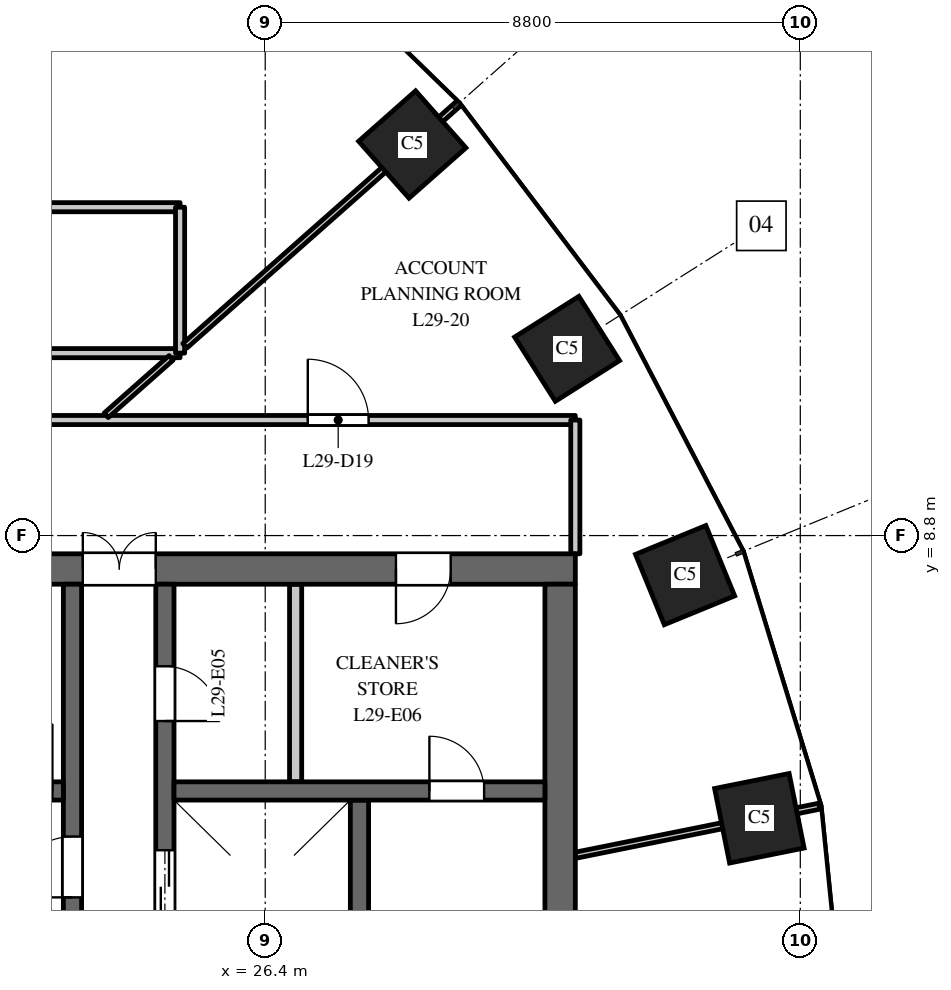
"""IFC4 building model, lengths in metres.
Left out: names, types, materials, properties, quantities, classifications, styles, units other than length and angle.
Written with IfcOpenShell. Run it as: python <this file> out.ifc"""

import sys

from ifc_helpers import new_model, si_unit, direction, frame, frame_2d, origin, origin_2d, place, context, subcontext, project, spatial, rectangle, extrude, element, fill, save


model = new_model("IFC4")
c1 = context("Model", 3, precision=1e-05, world=origin(), true_north=direction((0.0, 1.0)))
c2 = subcontext(c1, "Body", "Model", "MODEL_VIEW")
j1 = project(units=[si_unit("LENGTHUNIT", "METRE"), si_unit("PLANEANGLEUNIT", "RADIAN")], contexts=[c1])
p1 = place(None, origin())
s1 = spatial("IfcSite", under=j1, at=p1, CompositionType="ELEMENT")
p2 = place(p1, origin())
s2 = spatial("IfcBuilding", under=s1, at=p2, CompositionType="ELEMENT")
p3 = place(p2, frame((0.0, 0.0, 128.0)))
s3 = spatial("IfcBuildingStorey", under=s2, at=p3, CompositionType="ELEMENT", Elevation=128.0)
for number, where, z_axis, x_axis in (
    (1, (34.527, 4.151, 0.0), (0.0, 0.0, 1.0), (-0.197, 0.98, 0.0)),
    (2, (33.305, 8.149, 0.0), (0.0, 0.0, 1.0), (-0.379, 0.925, 0.0)),
    (3, (31.365, 11.871, 0.0), (0.0, 0.0, 1.0), (-0.535, 0.845, 0.0)),
    (4, (28.819, 15.23, 0.0), (0.0, 0.0, 1.0), (-0.663, 0.749, 0.0)),
):
    element("IfcColumn", number, at=place(p3, frame(where, z_axis=z_axis, x_axis=x_axis)), inside=s3, PredefinedType="COLUMN", context=c2, shape_type="SweptSolid", body=[
        extrude(rectangle(XDim=1.25, YDim=1.25, at=origin_2d()), origin(), (0.0, 0.0, 1.0), 4.0),
    ])
p4 = place(p3, frame((16.5, 8.25, 0.0), z_axis=(0.0, 0.0, 1.0), x_axis=(1.0, 0.0, 0.0)))
e5 = element("IfcWall", 5, at=p4, inside=s3, PredefinedType="SHEAR", context=c2, shape_type="SweptSolid", body=[
    extrude(rectangle(XDim=15.0, YDim=0.5, at=frame_2d((7.5, 0.0))), origin(), (0.0, 0.0, 1.0), 3.7),
])
p5 = place(p4, frame((6.9, 0.0, 0.0)))
e6 = element("IfcOpeningElement", 6, at=p5, cuts=e5, PredefinedType="OPENING", context=c2, shape_type="SweptSolid", body=[
    extrude(rectangle(XDim=1.2, YDim=2.1, at=frame_2d((0.6, 1.05))), frame((0.0, 0.26, 0.0), z_axis=(0.0, -1.0, 0.0), x_axis=(1.0, 0.0, 0.0)), (0.0, 0.0, 1.0), 0.52),
])
p6 = place(p4, frame((12.05, 0.0, 0.0)))
e7 = element("IfcOpeningElement", 7, at=p6, cuts=e5, PredefinedType="OPENING", context=c2, shape_type="SweptSolid", body=[
    extrude(rectangle(XDim=0.9, YDim=2.1, at=frame_2d((0.45, 1.05))), frame((0.0, 0.26, 0.0), z_axis=(0.0, -1.0, 0.0), x_axis=(1.0, 0.0, 0.0)), (0.0, 0.0, 1.0), 0.52),
])
p7 = place(p3, frame((27.95, -4.45, 0.0), z_axis=(0.0, 0.0, 1.0), x_axis=(0.0, 1.0, 0.0)))
e8 = element("IfcWall", 8, at=p7, inside=s3, PredefinedType="SHEAR", context=c2, shape_type="SweptSolid", body=[
    extrude(rectangle(XDim=8.9, YDim=0.3, at=frame_2d((4.45, 0.0))), origin(), (0.0, 0.0, 1.0), 3.7),
])
p8 = place(p3, frame((24.75, -8.0, 0.0), z_axis=(0.0, 0.0, 1.0), x_axis=(0.0, 1.0, 0.0)))
e9 = element("IfcWall", 9, at=p8, inside=s3, PredefinedType="SHEAR", context=c2, shape_type="SweptSolid", body=[
    extrude(rectangle(XDim=16.0, YDim=0.3, at=frame_2d((8.0, 0.0))), origin(), (0.0, 0.0, 1.0), 3.7),
])
p9 = place(p8, frame((4.425, 0.0, 0.0)))
e10 = element("IfcOpeningElement", 10, at=p9, cuts=e9, PredefinedType="OPENING", context=c2, shape_type="SweptSolid", body=[
    extrude(rectangle(XDim=1.1, YDim=2.1, at=frame_2d((0.55, 1.05))), frame((0.0, 0.16, 0.0), z_axis=(0.0, -1.0, 0.0), x_axis=(1.0, 0.0, 0.0)), (0.0, 0.0, 1.0), 0.32),
])
p10 = place(p8, frame((7.45, 0.0, 0.0)))
e11 = element("IfcOpeningElement", 11, at=p10, cuts=e9, PredefinedType="OPENING", context=c2, shape_type="SweptSolid", body=[
    extrude(rectangle(XDim=1.1, YDim=2.1, at=frame_2d((0.55, 1.05))), frame((0.0, 0.16, 0.0), z_axis=(0.0, -1.0, 0.0), x_axis=(1.0, 0.0, 0.0)), (0.0, 0.0, 1.0), 0.32),
])
p11 = place(p8, frame((10.425, 0.0, 0.0)))
e12 = element("IfcOpeningElement", 12, at=p11, cuts=e9, PredefinedType="OPENING", context=c2, shape_type="SweptSolid", body=[
    extrude(rectangle(XDim=1.2, YDim=2.1, at=frame_2d((0.6, 1.05))), frame((0.0, 0.16, 0.0), z_axis=(0.0, -1.0, 0.0), x_axis=(1.0, 0.0, 0.0)), (0.0, 0.0, 1.0), 0.32),
])
p12 = place(p8, frame((13.75, 0.0, 0.0)))
e13 = element("IfcOpeningElement", 13, at=p12, cuts=e9, PredefinedType="OPENING", context=c2, shape_type="SweptSolid", body=[
    extrude(rectangle(XDim=0.9, YDim=2.1, at=frame_2d((0.45, 1.05))), frame((0.0, 0.16, 0.0), z_axis=(0.0, -1.0, 0.0), x_axis=(1.0, 0.0, 0.0)), (0.0, 0.0, 1.0), 0.32),
])
p13 = place(p8, frame((1.35, 0.0, 0.0)))
e14 = element("IfcOpeningElement", 14, at=p13, cuts=e9, PredefinedType="OPENING", context=c2, shape_type="SweptSolid", body=[
    extrude(rectangle(XDim=0.9, YDim=2.1, at=frame_2d((0.45, 1.05))), frame((0.0, 0.16, 0.0), z_axis=(0.0, -1.0, 0.0), x_axis=(1.0, 0.0, 0.0)), (0.0, 0.0, 1.0), 0.32),
])
p14 = place(p3, frame((31.25, -8.0, 0.0), z_axis=(0.0, 0.0, 1.0), x_axis=(0.0, 1.0, 0.0)))
e15 = element("IfcWall", 15, at=p14, inside=s3, PredefinedType="SHEAR", context=c2, shape_type="SweptSolid", body=[
    extrude(rectangle(XDim=16.0, YDim=0.5, at=frame_2d((8.0, 0.0))), origin(), (0.0, 0.0, 1.0), 3.7),
])
p15 = place(p3, frame((24.9, 4.6, 0.0), z_axis=(0.0, 0.0, 1.0), x_axis=(1.0, 0.0, 0.0)))
e16 = element("IfcWall", 16, at=p15, inside=s3, PredefinedType="SHEAR", context=c2, shape_type="SweptSolid", body=[
    extrude(rectangle(XDim=6.1, YDim=0.3, at=frame_2d((3.05, 0.0))), origin(), (0.0, 0.0, 1.0), 3.7),
])
p16 = place(p15, frame((4.2, 0.0, 0.0)))
e17 = element("IfcOpeningElement", 17, at=p16, cuts=e16, PredefinedType="OPENING", context=c2, shape_type="SweptSolid", body=[
    extrude(rectangle(XDim=0.9, YDim=2.1, at=frame_2d((0.45, 1.05))), frame((0.0, 0.16, 0.0), z_axis=(0.0, -1.0, 0.0), x_axis=(1.0, 0.0, 0.0)), (0.0, 0.0, 1.0), 0.32),
])
p17 = place(p3, frame((26.9, 4.75, 0.0), z_axis=(0.0, 0.0, 1.0), x_axis=(0.0, 1.0, 0.0)))
e18 = element("IfcWall", 18, at=p17, inside=s3, PredefinedType="PARTITIONING", context=c2, shape_type="SweptSolid", body=[
    extrude(rectangle(XDim=3.25, YDim=0.2, at=frame_2d((1.625, 0.0))), origin(), (0.0, 0.0, 1.0), 3.7),
])
p18 = place(p3, frame((23.23, 2.25, 0.0), z_axis=(0.0, 0.0, 1.0), x_axis=(0.0, 1.0, 0.0)))
e19 = element("IfcWall", 19, at=p18, inside=s3, PredefinedType="SHEAR", context=c2, shape_type="SweptSolid", body=[
    extrude(rectangle(XDim=5.75, YDim=0.3, at=frame_2d((2.875, 0.0))), origin(), (0.0, 0.0, 1.0), 3.7),
])
p19 = place(p18, frame((0.6, 0.0, 0.0)))
e20 = element("IfcOpeningElement", 20, at=p19, cuts=e19, PredefinedType="OPENING", context=c2, shape_type="SweptSolid", body=[
    extrude(rectangle(XDim=1.0, YDim=2.1, at=frame_2d((0.5, 1.05))), frame((0.0, 0.16, 0.0), z_axis=(0.0, -1.0, 0.0), x_axis=(1.0, 0.0, 0.0)), (0.0, 0.0, 1.0), 0.32),
])
p20 = place(p3, frame((16.9, 4.6, 0.0), z_axis=(0.0, 0.0, 1.0), x_axis=(1.0, 0.0, 0.0)))
e21 = element("IfcWall", 21, at=p20, inside=s3, PredefinedType="SHEAR", context=c2, shape_type="SweptSolid", body=[
    extrude(rectangle(XDim=6.18, YDim=0.3, at=frame_2d((3.09, 0.0))), origin(), (0.0, 0.0, 1.0), 3.7),
])
p21 = place(p20, frame((4.9, 0.0, 0.0)))
e22 = element("IfcOpeningElement", 22, at=p21, cuts=e21, PredefinedType="OPENING", context=c2, shape_type="SweptSolid", body=[
    extrude(rectangle(XDim=1.1, YDim=2.1, at=frame_2d((0.55, 1.05))), frame((0.0, 0.16, 0.0), z_axis=(0.0, -1.0, 0.0), x_axis=(1.0, 0.0, 0.0)), (0.0, 0.0, 1.0), 0.32),
])
p22 = place(p3, frame((4.652, 14.2, 0.0), z_axis=(0.0, 0.0, 1.0), x_axis=(1.0, 0.0, 0.0)))
e23 = element("IfcWall", 23, at=p22, inside=s3, PredefinedType="PARTITIONING", context=c2, shape_type="SweptSolid", body=[
    extrude(rectangle(XDim=20.348, YDim=0.15, at=frame_2d((10.174, 0.0))), origin(), (0.0, 0.0, 1.0), 2.85),
])
p23 = place(p22, frame((9.698, 0.0, 0.0)))
e24 = element("IfcOpeningElement", 24, at=p23, cuts=e23, PredefinedType="OPENING", context=c2, shape_type="SweptSolid", body=[
    extrude(rectangle(XDim=1.0, YDim=2.1, at=frame_2d((0.5, 1.05))), frame((0.0, 0.085, 0.0), z_axis=(0.0, -1.0, 0.0), x_axis=(1.0, 0.0, 0.0)), (0.0, 0.0, 1.0), 0.17),
])
p24 = place(p3, frame((16.5, 10.7, 0.0), z_axis=(0.0, 0.0, 1.0), x_axis=(1.0, 0.0, 0.0)))
e25 = element("IfcWall", 25, at=p24, inside=s3, PredefinedType="PARTITIONING", context=c2, shape_type="SweptSolid", body=[
    extrude(rectangle(XDim=15.0, YDim=0.15, at=frame_2d((7.5, 0.0))), origin(), (0.0, 0.0, 1.0), 2.75),
])
p25 = place(p24, frame((10.6, 0.0, 0.0)))
e26 = element("IfcOpeningElement", 26, at=p25, cuts=e25, PredefinedType="OPENING", context=c2, shape_type="SweptSolid", body=[
    extrude(rectangle(XDim=1.0, YDim=2.1, at=frame_2d((0.5, 1.05))), frame((0.0, 0.085, 0.0), z_axis=(0.0, -1.0, 0.0), x_axis=(1.0, 0.0, 0.0)), (0.0, 0.0, 1.0), 0.17),
])
p26 = place(p3, frame((16.5, 11.8, 0.0), z_axis=(0.0, 0.0, 1.0), x_axis=(1.0, 0.0, 0.0)))
e27 = element("IfcWall", 27, at=p26, inside=s3, PredefinedType="PARTITIONING", context=c2, shape_type="SweptSolid", body=[
    extrude(rectangle(XDim=8.5, YDim=0.15, at=frame_2d((4.25, 0.0))), origin(), (0.0, 0.0, 1.0), 2.75),
])
p27 = place(p26, frame((3.65, 0.0, 0.0)))
e28 = element("IfcOpeningElement", 28, at=p27, cuts=e27, PredefinedType="OPENING", context=c2, shape_type="SweptSolid", body=[
    extrude(rectangle(XDim=1.0, YDim=2.1, at=frame_2d((0.5, 1.05))), frame((0.0, 0.085, 0.0), z_axis=(0.0, -1.0, 0.0), x_axis=(1.0, 0.0, 0.0)), (0.0, 0.0, 1.0), 0.17),
])
p28 = place(p3, frame((23.785, 10.778, 0.0), z_axis=(0.0, 0.0, 1.0), x_axis=(0.749052165765, 0.662511021013, 0.0)))
e29 = element("IfcWall", 29, at=p28, inside=s3, PredefinedType="PARTITIONING", context=c2, shape_type="SweptSolid", body=[
    extrude(rectangle(XDim=1.425, YDim=0.1, at=frame_2d((0.712, 0.0))), origin(), (0.0, 0.0, 1.0), 3.7),
])
p29 = place(p3, frame((25.0, 11.8, 0.0), z_axis=(0.0, 0.0, 1.0), x_axis=(0.0, 1.0, 0.0)))
e30 = element("IfcWall", 30, at=p29, inside=s3, PredefinedType="PARTITIONING", context=c2, shape_type="SweptSolid", body=[
    extrude(rectangle(XDim=2.4, YDim=0.15, at=frame_2d((1.2, 0.0))), origin(), (0.0, 0.0, 1.0), 2.75),
])
p30 = place(p3, frame((25.078, 11.921, 0.0), z_axis=(0.0, 0.0, 1.0), x_axis=(0.748903310324, 0.662679282749, 0.0)))
e31 = element("IfcWall", 31, at=p30, inside=s3, PredefinedType="PARTITIONING", context=c2, shape_type="SweptSolid", body=[
    extrude(rectangle(XDim=5.997, YDim=0.1, at=frame_2d((2.999, 0.0))), origin(), (0.0, 0.0, 1.0), 3.7),
])
p31 = place(p3, frame((31.5, 3.542, 0.0), z_axis=(0.0, 0.0, 1.0), x_axis=(0.980357474535, 0.197228857227, 0.0)))
e32 = element("IfcWall", 32, at=p31, inside=s3, PredefinedType="PARTITIONING", context=c2, shape_type="SweptSolid", body=[
    extrude(rectangle(XDim=4.092, YDim=0.1, at=frame_2d((2.046, 0.0))), origin(), (0.0, 0.0, 1.0), 2.9),
])
p32 = place(p3, frame((31.5, 8.5, 0.0), z_axis=(0.0, 0.0, 1.0), x_axis=(0.0, 1.0, 0.0)))
e33 = element("IfcWall", 33, at=p32, inside=s3, PredefinedType="PARTITIONING", context=c2, shape_type="SweptSolid", body=[
    extrude(rectangle(XDim=2.2, YDim=0.15, at=frame_2d((1.1, 0.0))), origin(), (0.0, 0.0, 1.0), 2.9),
])
p33 = place(p11, origin())
e34 = element("IfcDoor", 34, at=p33, inside=s3, OperationType="DOUBLE_DOOR_SLIDING", PredefinedType="DOOR", context=c2, shape_type="SweptSolid", body=[
    extrude(rectangle(XDim=1.2, YDim=2.1, at=frame_2d((0.6, 1.05))), frame((0.0, 0.025, 0.0), z_axis=(0.0, -1.0, 0.0), x_axis=(1.0, 0.0, 0.0)), (0.0, 0.0, 1.0), 0.05),
])
fill(e12, e34)
p34 = place(p21, origin())
e35 = element("IfcDoor", 35, at=p34, inside=s3, OperationType="SINGLE_SWING_LEFT", PredefinedType="DOOR", context=c2, shape_type="SweptSolid", body=[
    extrude(rectangle(XDim=1.1, YDim=2.1, at=frame_2d((0.55, 1.05))), frame((0.0, 0.025, 0.0), z_axis=(0.0, -1.0, 0.0), x_axis=(1.0, 0.0, 0.0)), (0.0, 0.0, 1.0), 0.05),
])
fill(e22, e35)
p35 = place(p19, origin())
e36 = element("IfcDoor", 36, at=p35, inside=s3, OperationType="SINGLE_SWING_RIGHT", PredefinedType="DOOR", context=c2, shape_type="SweptSolid", body=[
    extrude(rectangle(XDim=1.0, YDim=2.1, at=frame_2d((0.5, 1.05))), frame((0.0, 0.025, 0.0), z_axis=(0.0, -1.0, 0.0), x_axis=(1.0, 0.0, 0.0)), (0.0, 0.0, 1.0), 0.05),
])
fill(e20, e36)
p36 = place(p5, origin())
e37 = element("IfcDoor", 37, at=p36, inside=s3, OperationType="DOUBLE_DOOR_DOUBLE_SWING", PredefinedType="DOOR", context=c2, shape_type="SweptSolid", body=[
    extrude(rectangle(XDim=1.2, YDim=2.1, at=frame_2d((0.6, 1.05))), frame((0.0, 0.025, 0.0), z_axis=(0.0, -1.0, 0.0), x_axis=(1.0, 0.0, 0.0)), (0.0, 0.0, 1.0), 0.05),
])
fill(e6, e37)
p37 = place(p12, origin())
e38 = element("IfcDoor", 38, at=p37, inside=s3, OperationType="SINGLE_SWING_LEFT", PredefinedType="DOOR", context=c2, shape_type="SweptSolid", body=[
    extrude(rectangle(XDim=0.9, YDim=2.1, at=frame_2d((0.45, 1.05))), frame((0.0, 0.025, 0.0), z_axis=(0.0, -1.0, 0.0), x_axis=(1.0, 0.0, 0.0)), (0.0, 0.0, 1.0), 0.05),
])
fill(e13, e38)
p38 = place(p6, origin())
e39 = element("IfcDoor", 39, at=p38, inside=s3, OperationType="SINGLE_SWING_LEFT", PredefinedType="DOOR", context=c2, shape_type="SweptSolid", body=[
    extrude(rectangle(XDim=0.9, YDim=2.1, at=frame_2d((0.45, 1.05))), frame((0.0, 0.025, 0.0), z_axis=(0.0, -1.0, 0.0), x_axis=(1.0, 0.0, 0.0)), (0.0, 0.0, 1.0), 0.05),
])
fill(e7, e39)
p39 = place(p16, origin())
e40 = element("IfcDoor", 40, at=p39, inside=s3, OperationType="SINGLE_SWING_RIGHT", PredefinedType="DOOR", context=c2, shape_type="SweptSolid", body=[
    extrude(rectangle(XDim=0.9, YDim=2.1, at=frame_2d((0.45, 1.05))), frame((0.0, 0.025, 0.0), z_axis=(0.0, -1.0, 0.0), x_axis=(1.0, 0.0, 0.0)), (0.0, 0.0, 1.0), 0.05),
])
fill(e17, e40)
p40 = place(p25, origin())
e41 = element("IfcDoor", 41, at=p40, inside=s3, OperationType="SINGLE_SWING_LEFT", PredefinedType="DOOR", context=c2, shape_type="SweptSolid", body=[
    extrude(rectangle(XDim=1.0, YDim=2.1, at=frame_2d((0.5, 1.05))), frame((0.0, 0.025, 0.0), z_axis=(0.0, -1.0, 0.0), x_axis=(1.0, 0.0, 0.0)), (0.0, 0.0, 1.0), 0.05),
])
fill(e26, e41)
save(model, sys.argv[1])
